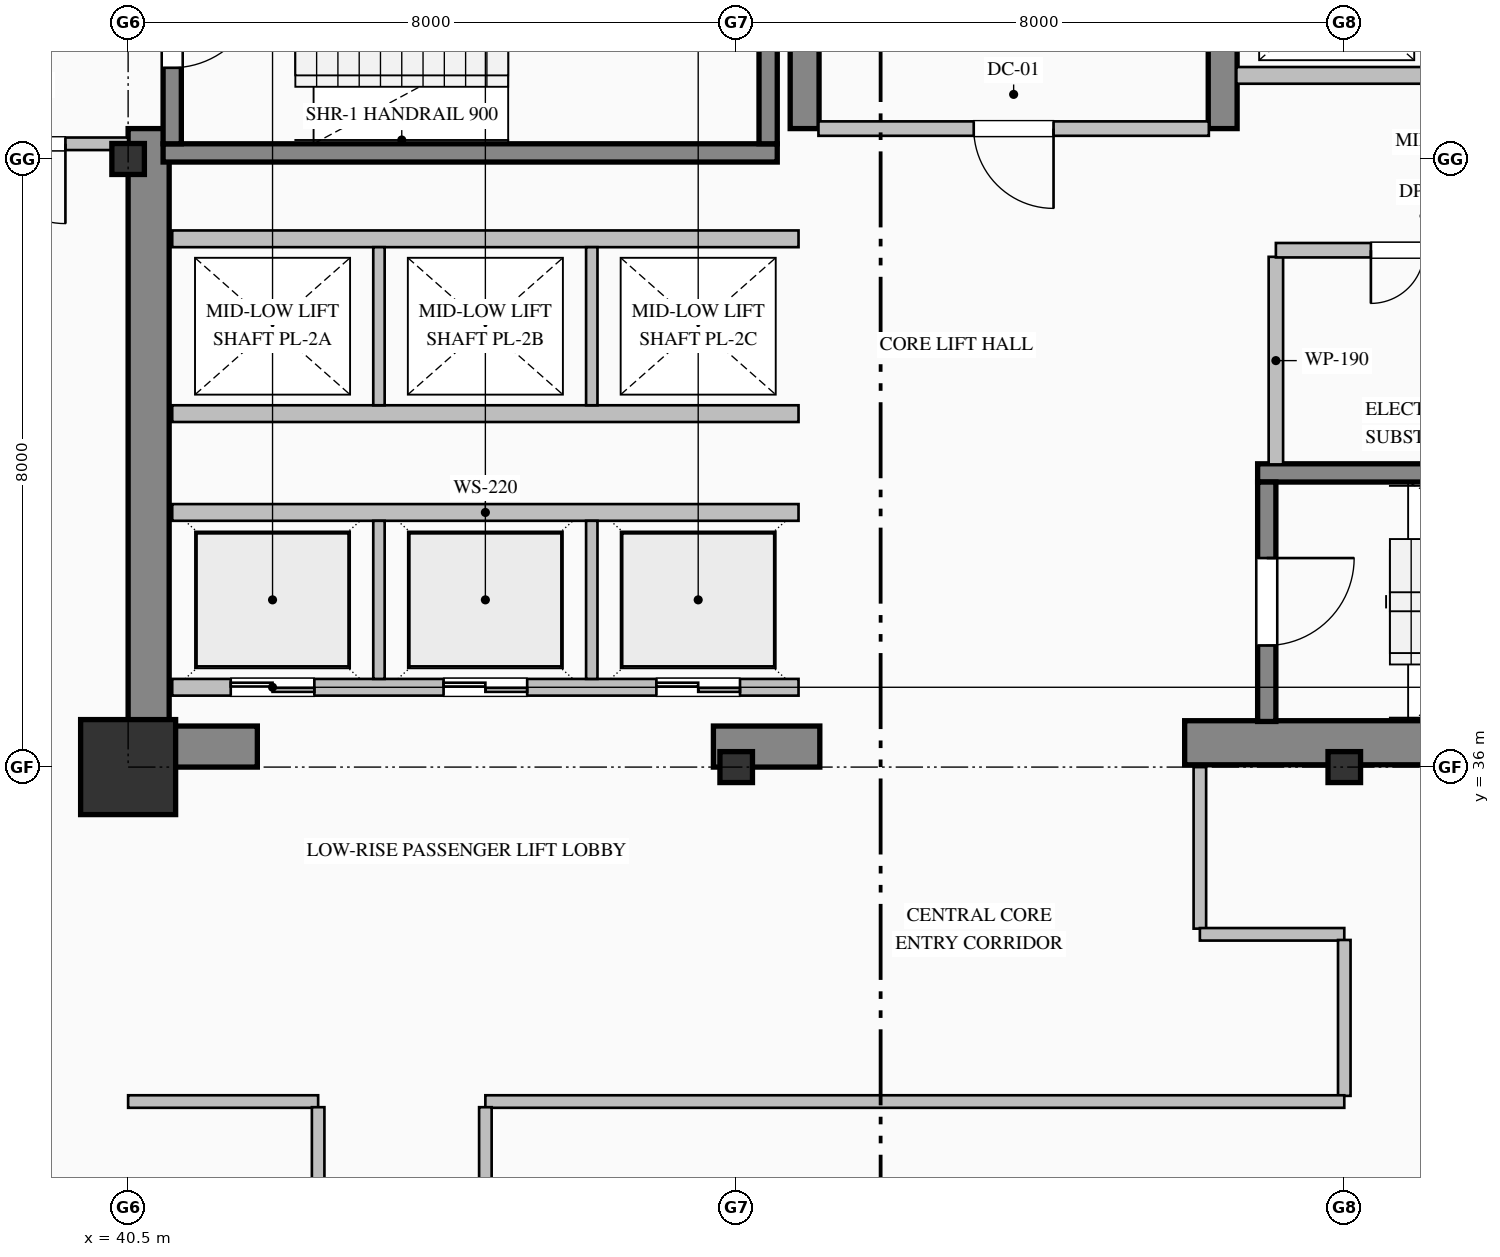
"""IFC4 building model, lengths in metres.
Left out: names, types, materials, properties, quantities, classifications, styles, units other than length and angle.
Written with IfcOpenShell. Run it as: python <this file> out.ifc"""

import sys

from ifc_helpers import new_model, si_unit, direction, frame, frame_2d, origin, origin_2d, place, context, subcontext, project, spatial, rectangle, hollow_rectangle, i_section, extrude, element, fill, save


model = new_model("IFC4")
c1 = context("Model", 3, precision=1e-05, world=origin(), true_north=direction((0.0, 1.0)))
c2 = subcontext(c1, "Body", "Model", "MODEL_VIEW")
j1 = project(units=[si_unit("LENGTHUNIT", "METRE"), si_unit("PLANEANGLEUNIT", "RADIAN")], contexts=[c1])
p1 = place(None, origin())
s1 = spatial("IfcSite", under=j1, at=p1, CompositionType="ELEMENT")
p2 = place(p1, origin())
s2 = spatial("IfcBuilding", under=s1, at=p2, CompositionType="ELEMENT")
p3 = place(p2, frame((0.0, 0.0, 52.2)))
s3 = spatial("IfcBuildingStorey", under=s2, at=p3, CompositionType="ELEMENT", Elevation=52.2)
p4 = place(p3, frame((40.77, 36.54, 0.0), z_axis=(0.0, 0.0, 1.0), x_axis=(0.0, 1.0, 0.0)))
e1 = element("IfcWall", 1, at=p4, inside=s3, PredefinedType="SHEAR", context=c2, shape_type="SweptSolid", body=[
    extrude(rectangle(XDim=7.86, YDim=0.54, at=frame_2d((3.93, 0.0))), origin(), (0.0, 0.0, 1.0), 3.75),
])
p5 = place(p3, frame((40.5, 36.27, 0.0), z_axis=(0.0, 0.0, 1.0), x_axis=(1.0, 0.0, 0.0)))
e2 = element("IfcWall", 2, at=p5, inside=s3, PredefinedType="SHEAR", context=c2, shape_type="SweptSolid", body=[
    extrude(rectangle(XDim=1.7, YDim=0.54, at=frame_2d((0.85, 0.0))), origin(), (0.0, 0.0, 1.0), 3.75),
])
p6 = place(p3, frame((48.2, 36.27, 0.0), z_axis=(0.0, 0.0, 1.0), x_axis=(1.0, 0.0, 0.0)))
e3 = element("IfcWall", 3, at=p6, inside=s3, PredefinedType="SHEAR", context=c2, shape_type="SweptSolid", body=[
    extrude(rectangle(XDim=1.4, YDim=0.54, at=frame_2d((0.7, 0.0))), origin(), (0.0, 0.0, 1.0), 3.75),
])
p7 = place(p3, frame((54.4, 36.32, 0.0), z_axis=(0.0, 0.0, 1.0), x_axis=(1.0, 0.0, 0.0)))
e4 = element("IfcWall", 4, at=p7, inside=s3, PredefinedType="SHEAR", context=c2, shape_type="SweptSolid", body=[
    extrude(rectangle(XDim=9.6, YDim=0.58, at=frame_2d((4.8, 0.0))), origin(), (0.0, 0.0, 1.0), 4.0),
])
p8 = place(p3, frame((49.4, 44.4, 0.0), z_axis=(0.0, 0.0, 1.0), x_axis=(0.0, 1.0, 0.0)))
e5 = element("IfcWall", 5, at=p8, inside=s3, PredefinedType="SHEAR", context=c2, shape_type="SweptSolid", body=[
    extrude(rectangle(XDim=3.0, YDim=0.38, at=frame_2d((1.5, 0.0))), origin(), (0.0, 0.0, 1.0), 3.75),
])
p9 = place(p3, frame((54.9, 44.4, 0.0), z_axis=(0.0, 0.0, 1.0), x_axis=(0.0, 1.0, 0.0)))
e6 = element("IfcWall", 6, at=p9, inside=s3, PredefinedType="SHEAR", context=c2, shape_type="SweptSolid", body=[
    extrude(rectangle(XDim=7.06, YDim=0.38, at=frame_2d((3.53, 0.0))), origin(), (0.0, 0.0, 1.0), 3.75),
])
p10 = place(p3, frame((40.5, 36.0, 0.0), z_axis=(0.0, 0.0, 1.0), x_axis=(1.0, 0.0, 0.0)))
e7 = element("IfcColumn", 7, at=p10, inside=s3, PredefinedType="COLUMN", context=c2, shape_type="SweptSolid", body=[
    extrude(hollow_rectangle(XDim=1.25, YDim=1.25, WallThickness=0.045, at=origin_2d()), origin(), (0.0, 0.0, 1.0), 4.0),
])
for number, where, z_axis, x_axis in (
    (8, (40.5, 44.0, 0.0), (0.0, 0.0, 1.0), (1.0, 0.0, 0.0)),
    (9, (48.5, 36.0, 0.0), (0.0, 0.0, 1.0), (1.0, 0.0, 0.0)),
    (10, (56.5, 36.0, 0.0), (0.0, 0.0, 1.0), (1.0, 0.0, 0.0)),
):
    element("IfcColumn", number, at=place(p3, frame(where, z_axis=z_axis, x_axis=x_axis)), inside=s3, PredefinedType="COLUMN", context=c2, shape_type="SweptSolid", body=[
        extrude(i_section(OverallWidth=0.407, OverallDepth=0.428, WebThickness=0.02, FlangeThickness=0.035, FilletRadius=0.022, at=origin_2d()), origin(), (0.0, 0.0, 1.0), 4.0),
    ])
p11 = place(p3, frame((49.04, 44.08, 0.0), z_axis=(0.0, 0.0, 1.0), x_axis=(-1.0, 0.0, 0.0)))
e11 = element("IfcWall", 11, at=p11, inside=s3, PredefinedType="SOLIDWALL", context=c2, shape_type="SweptSolid", body=[
    extrude(rectangle(XDim=8.08, YDim=0.24, at=frame_2d((4.04, 0.0))), origin(), (0.0, 0.0, 1.0), 4.0),
])
p12 = place(p3, frame((41.08, 47.35, 0.0), z_axis=(0.0, 0.0, 1.0), x_axis=(0.0, -1.0, 0.0)))
e12 = element("IfcWall", 12, at=p12, inside=s3, PredefinedType="SOLIDWALL", context=c2, shape_type="SweptSolid", body=[
    extrude(rectangle(XDim=3.15, YDim=0.24, at=frame_2d((1.575, 0.0))), origin(), (0.0, 0.0, 1.0), 4.0),
])
p13 = place(p12, frame((1.0, 0.0, 0.0)))
e13 = element("IfcOpeningElement", 13, at=p13, cuts=e12, PredefinedType="OPENING", context=c2, shape_type="SweptSolid", body=[
    extrude(rectangle(XDim=1.15, YDim=2.2, at=frame_2d((0.575, 1.1))), frame((0.0, 0.13, 0.0), z_axis=(0.0, -1.0, 0.0), x_axis=(1.0, 0.0, 0.0)), (0.0, 0.0, 1.0), 0.26),
])
p14 = place(p3, frame((48.92, 44.2, 0.0), z_axis=(0.0, 0.0, 1.0), x_axis=(0.0, 1.0, 0.0)))
e14 = element("IfcWall", 14, at=p14, inside=s3, PredefinedType="SOLIDWALL", context=c2, shape_type="SweptSolid", body=[
    extrude(rectangle(XDim=3.15, YDim=0.24, at=frame_2d((1.575, 0.0))), origin(), (0.0, 0.0, 1.0), 4.0),
])
p15 = place(p3, frame((55.36, 39.87, 0.0), z_axis=(0.0, 0.0, 1.0), x_axis=(1.0, 0.0, 0.0)))
e15 = element("IfcWall", 15, at=p15, inside=s3, PredefinedType="SOLIDWALL", context=c2, shape_type="SweptSolid", body=[
    extrude(rectangle(XDim=8.08, YDim=0.24, at=frame_2d((4.04, 0.0))), origin(), (0.0, 0.0, 1.0), 4.0),
])
p16 = place(p3, frame((55.48, 39.75, 0.0), z_axis=(0.0, 0.0, 1.0), x_axis=(0.0, -1.0, 0.0)))
e16 = element("IfcWall", 16, at=p16, inside=s3, PredefinedType="SOLIDWALL", context=c2, shape_type="SweptSolid", body=[
    extrude(rectangle(XDim=3.15, YDim=0.24, at=frame_2d((1.575, 0.0))), origin(), (0.0, 0.0, 1.0), 4.0),
])
p17 = place(p16, frame((1.0, 0.0, 0.0)))
e17 = element("IfcOpeningElement", 17, at=p17, cuts=e16, PredefinedType="OPENING", context=c2, shape_type="SweptSolid", body=[
    extrude(rectangle(XDim=1.15, YDim=2.2, at=frame_2d((0.575, 1.1))), frame((0.0, 0.13, 0.0), z_axis=(0.0, -1.0, 0.0), x_axis=(1.0, 0.0, 0.0)), (0.0, 0.0, 1.0), 0.26),
])
p18 = place(p3, frame((49.32, 37.05, 0.0), z_axis=(0.0, 0.0, 1.0), x_axis=(-1.0, 0.0, 0.0)))
e18 = element("IfcWall", 18, at=p18, inside=s3, PredefinedType="PARTITIONING", context=c2, shape_type="SweptSolid", body=[
    extrude(rectangle(XDim=8.24, YDim=0.22, at=frame_2d((4.12, 0.0))), origin(), (0.0, 0.0, 1.0), 3.75),
])
p19 = place(p18, frame((6.37, 0.0, 0.0)))
e19 = element("IfcOpeningElement", 19, at=p19, cuts=e18, PredefinedType="OPENING", context=c2, shape_type="SweptSolid", body=[
    extrude(rectangle(XDim=1.1, YDim=2.2, at=frame_2d((0.55, 1.1))), frame((0.0, 0.12, 0.0), z_axis=(0.0, -1.0, 0.0), x_axis=(1.0, 0.0, 0.0)), (0.0, 0.0, 1.0), 0.24),
])
p20 = place(p18, frame((3.57, 0.0, 0.0)))
e20 = element("IfcOpeningElement", 20, at=p20, cuts=e18, PredefinedType="OPENING", context=c2, shape_type="SweptSolid", body=[
    extrude(rectangle(XDim=1.1, YDim=2.2, at=frame_2d((0.55, 1.1))), frame((0.0, 0.12, 0.0), z_axis=(0.0, -1.0, 0.0), x_axis=(1.0, 0.0, 0.0)), (0.0, 0.0, 1.0), 0.24),
])
p21 = place(p18, frame((0.77, 0.0, 0.0)))
e21 = element("IfcOpeningElement", 21, at=p21, cuts=e18, PredefinedType="OPENING", context=c2, shape_type="SweptSolid", body=[
    extrude(rectangle(XDim=1.1, YDim=2.2, at=frame_2d((0.55, 1.1))), frame((0.0, 0.12, 0.0), z_axis=(0.0, -1.0, 0.0), x_axis=(1.0, 0.0, 0.0)), (0.0, 0.0, 1.0), 0.24),
])
p22 = place(p3, frame((41.08, 39.35, 0.0), z_axis=(0.0, 0.0, 1.0), x_axis=(1.0, 0.0, 0.0)))
e22 = element("IfcWall", 22, at=p22, inside=s3, PredefinedType="PARTITIONING", context=c2, shape_type="SweptSolid", body=[
    extrude(rectangle(XDim=8.24, YDim=0.22, at=frame_2d((4.12, 0.0))), origin(), (0.0, 0.0, 1.0), 3.75),
])
for number, where, z_axis, x_axis in (
    (23, (43.8, 37.16, 0.0), (0.0, 0.0, 1.0), (0.0, 1.0, 0.0)),
    (24, (46.6, 37.16, 0.0), (0.0, 0.0, 1.0), (0.0, 1.0, 0.0)),
):
    element("IfcWall", number, at=place(p3, frame(where, z_axis=z_axis, x_axis=x_axis)), inside=s3, PredefinedType="PARTITIONING", context=c2, shape_type="SweptSolid", body=[
        extrude(rectangle(XDim=2.08, YDim=0.15, at=frame_2d((1.04, 0.0))), origin(), (0.0, 0.0, 1.0), 3.75),
    ])
for number, where, z_axis, x_axis in (
    (25, (49.32, 40.65, 0.0), (0.0, 0.0, 1.0), (-1.0, 0.0, 0.0)),
    (26, (41.08, 42.95, 0.0), (0.0, 0.0, 1.0), (1.0, 0.0, 0.0)),
):
    element("IfcWall", number, at=place(p3, frame(where, z_axis=z_axis, x_axis=x_axis)), inside=s3, PredefinedType="PARTITIONING", context=c2, shape_type="SweptSolid", body=[
        extrude(rectangle(XDim=8.24, YDim=0.22, at=frame_2d((4.12, 0.0))), origin(), (0.0, 0.0, 1.0), 3.75),
    ])
for number, where, z_axis, x_axis in (
    (27, (43.8, 40.76, 0.0), (0.0, 0.0, 1.0), (0.0, 1.0, 0.0)),
    (28, (46.6, 40.76, 0.0), (0.0, 0.0, 1.0), (0.0, 1.0, 0.0)),
):
    element("IfcWall", number, at=place(p3, frame(where, z_axis=z_axis, x_axis=x_axis)), inside=s3, PredefinedType="PARTITIONING", context=c2, shape_type="SweptSolid", body=[
        extrude(rectangle(XDim=2.08, YDim=0.15, at=frame_2d((1.04, 0.0))), origin(), (0.0, 0.0, 1.0), 3.75),
    ])
p23 = place(p3, frame((63.32, 45.1, 0.0), z_axis=(0.0, 0.0, 1.0), x_axis=(-1.0, 0.0, 0.0)))
e29 = element("IfcWall", 29, at=p23, inside=s3, PredefinedType="PARTITIONING", context=c2, shape_type="SweptSolid", body=[
    extrude(rectangle(XDim=8.24, YDim=0.22, at=frame_2d((4.12, 0.0))), origin(), (0.0, 0.0, 1.0), 3.75),
])
p24 = place(p3, frame((40.5, 44.2, 0.0), z_axis=(0.0, 0.0, 1.0), x_axis=(-1.0, 0.0, 0.0)))
e30 = element("IfcWall", 30, at=p24, inside=s3, PredefinedType="PARTITIONING", context=c2, shape_type="SweptSolid", body=[
    extrude(rectangle(XDim=2.7, YDim=0.165, at=frame_2d((1.35, 0.0))), origin(), (0.0, 0.0, 1.0), 3.75),
])
p25 = place(p24, frame((0.825, 0.0, 0.0)))
e31 = element("IfcOpeningElement", 31, at=p25, cuts=e30, PredefinedType="OPENING", context=c2, shape_type="SweptSolid", body=[
    extrude(rectangle(XDim=1.05, YDim=2.15, at=frame_2d((0.525, 1.075))), frame((0.0, 0.093, 0.0), z_axis=(0.0, -1.0, 0.0), x_axis=(1.0, 0.0, 0.0)), (0.0, 0.0, 1.0), 0.185),
])
p26 = place(p3, frame((54.718, 44.4, 0.0), z_axis=(0.0, 0.0, 1.0), x_axis=(-1.0, 0.0, 0.0)))
e32 = element("IfcWall", 32, at=p26, inside=s3, PredefinedType="PARTITIONING", context=c2, shape_type="SweptSolid", body=[
    extrude(rectangle(XDim=5.136, YDim=0.19, at=frame_2d((2.568, 0.0))), origin(), (0.0, 0.0, 1.0), 3.75),
])
p27 = place(p26, frame((2.043, 0.0, 0.0)))
e33 = element("IfcOpeningElement", 33, at=p27, cuts=e32, PredefinedType="OPENING", context=c2, shape_type="SweptSolid", body=[
    extrude(rectangle(XDim=1.05, YDim=2.15, at=frame_2d((0.525, 1.075))), frame((0.0, 0.105, 0.0), z_axis=(0.0, -1.0, 0.0), x_axis=(1.0, 0.0, 0.0)), (0.0, 0.0, 1.0), 0.21),
])
p28 = place(p3, frame((55.6, 42.713, 0.0), z_axis=(0.0, 0.0, 1.0), x_axis=(0.0, -1.0, 0.0)))
e34 = element("IfcWall", 34, at=p28, inside=s3, PredefinedType="PARTITIONING", context=c2, shape_type="SweptSolid", body=[
    extrude(rectangle(XDim=2.731, YDim=0.19, at=frame_2d((1.365, 0.0))), origin(), (0.0, 0.0, 1.0), 3.75),
])
p29 = place(p3, frame((59.5, 42.8, 0.0), z_axis=(0.0, 0.0, 1.0), x_axis=(-1.0, 0.0, 0.0)))
e35 = element("IfcWall", 35, at=p29, inside=s3, PredefinedType="PARTITIONING", context=c2, shape_type="SweptSolid", body=[
    extrude(rectangle(XDim=3.9, YDim=0.19, at=frame_2d((1.95, 0.0))), origin(), (0.0, 0.0, 1.0), 3.75),
])
p30 = place(p29, frame((1.25, 0.0, 0.0)))
e36 = element("IfcOpeningElement", 36, at=p30, cuts=e35, PredefinedType="OPENING", context=c2, shape_type="SweptSolid", body=[
    extrude(rectangle(XDim=1.4, YDim=2.25, at=frame_2d((0.7, 1.125))), frame((0.0, 0.105, 0.0), z_axis=(0.0, -1.0, 0.0), x_axis=(1.0, 0.0, 0.0)), (0.0, 0.0, 1.0), 0.21),
])
p31 = place(p3, frame((54.6, 36.0, 0.0), z_axis=(0.0, 0.0, 1.0), x_axis=(0.0, -1.0, 0.0)))
e37 = element("IfcWall", 37, at=p31, inside=s3, PredefinedType="PARTITIONING", context=c2, shape_type="SweptSolid", body=[
    extrude(rectangle(XDim=2.125, YDim=0.165, at=frame_2d((1.063, 0.0))), origin(), (0.0, 0.0, 1.0), 3.75),
])
p32 = place(p3, frame((54.6, 33.8, 0.0), z_axis=(0.0, 0.0, 1.0), x_axis=(1.0, 0.0, 0.0)))
e38 = element("IfcWall", 38, at=p32, inside=s3, PredefinedType="PARTITIONING", context=c2, shape_type="SweptSolid", body=[
    extrude(rectangle(XDim=1.9, YDim=0.165, at=frame_2d((0.95, 0.0))), origin(), (0.0, 0.0, 1.0), 3.75),
])
p33 = place(p3, frame((56.5, 33.726, 0.0), z_axis=(0.0, 0.0, 1.0), x_axis=(0.0, -1.0, 0.0)))
e39 = element("IfcWall", 39, at=p33, inside=s3, PredefinedType="PARTITIONING", context=c2, shape_type="SweptSolid", body=[
    extrude(rectangle(XDim=2.051, YDim=0.165, at=frame_2d((1.025, 0.0))), origin(), (0.0, 0.0, 1.0), 3.042),
])
p34 = place(p3, frame((56.5, 31.6, 0.0), z_axis=(0.0, 0.0, 1.0), x_axis=(-1.0, 0.0, 0.0)))
e40 = element("IfcWall", 40, at=p34, inside=s3, PredefinedType="PARTITIONING", context=c2, shape_type="SweptSolid", body=[
    extrude(rectangle(XDim=11.3, YDim=0.165, at=frame_2d((5.65, 0.0))), origin(), (0.0, 0.0, 1.0), 3.75),
])
p35 = place(p3, frame((43.0, 31.6, 0.0), z_axis=(0.0, 0.0, 1.0), x_axis=(-1.0, 0.0, 0.0)))
e41 = element("IfcWall", 41, at=p35, inside=s3, PredefinedType="PARTITIONING", context=c2, shape_type="SweptSolid", body=[
    extrude(rectangle(XDim=2.5, YDim=0.165, at=frame_2d((1.25, 0.0))), origin(), (0.0, 0.0, 1.0), 3.75),
])
p36 = place(p3, frame((45.2, 31.525, 0.0), z_axis=(0.0, 0.0, 1.0), x_axis=(0.0, -1.0, 0.0)))
e42 = element("IfcWall", 42, at=p36, inside=s3, PredefinedType="PARTITIONING", context=c2, shape_type="SweptSolid", body=[
    extrude(rectangle(XDim=16.751, YDim=0.165, at=frame_2d((8.375, 0.0))), origin(), (0.0, 0.0, 1.0), 3.75),
])
p37 = place(p36, frame((7.875, 0.0, 0.0)))
e43 = element("IfcOpeningElement", 43, at=p37, cuts=e42, PredefinedType="OPENING", context=c2, shape_type="SweptSolid", body=[
    extrude(rectangle(XDim=1.0, YDim=2.15, at=frame_2d((0.5, 1.075))), frame((0.0, 0.093, 0.0), z_axis=(0.0, -1.0, 0.0), x_axis=(1.0, 0.0, 0.0)), (0.0, 0.0, 1.0), 0.185),
])
p38 = place(p3, frame((43.0, 12.574, 0.0), z_axis=(0.0, 0.0, 1.0), x_axis=(0.0, 1.0, 0.0)))
e44 = element("IfcWall", 44, at=p38, inside=s3, PredefinedType="PARTITIONING", context=c2, shape_type="SweptSolid", body=[
    extrude(rectangle(XDim=18.951, YDim=0.165, at=frame_2d((9.476, 0.0))), origin(), (0.0, 0.0, 1.0), 3.75),
])
p39 = place(p38, frame((8.976, 0.0, 0.0)))
e45 = element("IfcOpeningElement", 45, at=p39, cuts=e44, PredefinedType="OPENING", context=c2, shape_type="SweptSolid", body=[
    extrude(rectangle(XDim=1.0, YDim=2.15, at=frame_2d((0.5, 1.075))), frame((0.0, 0.093, 0.0), z_axis=(0.0, -1.0, 0.0), x_axis=(1.0, 0.0, 0.0)), (0.0, 0.0, 1.0), 0.185),
])
p40 = place(p13, origin())
e46 = element("IfcDoor", 46, at=p40, inside=s3, OperationType="SINGLE_SWING_LEFT", PredefinedType="DOOR", context=c2, shape_type="SweptSolid", body=[
    extrude(rectangle(XDim=1.15, YDim=2.2, at=frame_2d((0.575, 1.1))), frame((0.0, 0.025, 0.0), z_axis=(0.0, -1.0, 0.0), x_axis=(1.0, 0.0, 0.0)), (0.0, 0.0, 1.0), 0.05),
])
fill(e13, e46)
p41 = place(p17, origin())
e47 = element("IfcDoor", 47, at=p41, inside=s3, OperationType="SINGLE_SWING_LEFT", PredefinedType="DOOR", context=c2, shape_type="SweptSolid", body=[
    extrude(rectangle(XDim=1.15, YDim=2.2, at=frame_2d((0.575, 1.1))), frame((0.0, 0.025, 0.0), z_axis=(0.0, -1.0, 0.0), x_axis=(1.0, 0.0, 0.0)), (0.0, 0.0, 1.0), 0.05),
])
fill(e17, e47)
p42 = place(p19, origin())
e48 = element("IfcDoor", 48, at=p42, inside=s3, OperationType="DOUBLE_DOOR_SLIDING", PredefinedType="DOOR", context=c2, shape_type="SweptSolid", body=[
    extrude(rectangle(XDim=1.1, YDim=2.2, at=frame_2d((0.55, 1.1))), frame((0.0, 0.025, 0.0), z_axis=(0.0, -1.0, 0.0), x_axis=(1.0, 0.0, 0.0)), (0.0, 0.0, 1.0), 0.05),
])
fill(e19, e48)
p43 = place(p20, origin())
e49 = element("IfcDoor", 49, at=p43, inside=s3, OperationType="DOUBLE_DOOR_SLIDING", PredefinedType="DOOR", context=c2, shape_type="SweptSolid", body=[
    extrude(rectangle(XDim=1.1, YDim=2.2, at=frame_2d((0.55, 1.1))), frame((0.0, 0.025, 0.0), z_axis=(0.0, -1.0, 0.0), x_axis=(1.0, 0.0, 0.0)), (0.0, 0.0, 1.0), 0.05),
])
fill(e20, e49)
p44 = place(p21, origin())
e50 = element("IfcDoor", 50, at=p44, inside=s3, OperationType="DOUBLE_DOOR_SLIDING", PredefinedType="DOOR", context=c2, shape_type="SweptSolid", body=[
    extrude(rectangle(XDim=1.1, YDim=2.2, at=frame_2d((0.55, 1.1))), frame((0.0, 0.025, 0.0), z_axis=(0.0, -1.0, 0.0), x_axis=(1.0, 0.0, 0.0)), (0.0, 0.0, 1.0), 0.05),
])
fill(e21, e50)
p45 = place(p27, origin())
e51 = element("IfcDoor", 51, at=p45, inside=s3, OperationType="SINGLE_SWING_LEFT", PredefinedType="DOOR", context=c2, shape_type="SweptSolid", body=[
    extrude(rectangle(XDim=1.05, YDim=2.15, at=frame_2d((0.525, 1.075))), frame((0.0, 0.025, 0.0), z_axis=(0.0, -1.0, 0.0), x_axis=(1.0, 0.0, 0.0)), (0.0, 0.0, 1.0), 0.05),
])
fill(e33, e51)
p46 = place(p25, origin())
e52 = element("IfcDoor", 52, at=p46, inside=s3, OperationType="SINGLE_SWING_LEFT", PredefinedType="DOOR", context=c2, shape_type="SweptSolid", body=[
    extrude(rectangle(XDim=1.05, YDim=2.15, at=frame_2d((0.525, 1.075))), frame((0.0, 0.025, 0.0), z_axis=(0.0, -1.0, 0.0), x_axis=(1.0, 0.0, 0.0)), (0.0, 0.0, 1.0), 0.05),
])
fill(e31, e52)
p47 = place(p30, origin())
e53 = element("IfcDoor", 53, at=p47, inside=s3, OperationType="DOUBLE_DOOR_SINGLE_SWING", PredefinedType="DOOR", context=c2, shape_type="SweptSolid", body=[
    extrude(rectangle(XDim=1.4, YDim=2.25, at=frame_2d((0.7, 1.125))), frame((0.0, 0.025, 0.0), z_axis=(0.0, -1.0, 0.0), x_axis=(1.0, 0.0, 0.0)), (0.0, 0.0, 1.0), 0.05),
])
fill(e36, e53)
save(model, sys.argv[1])
